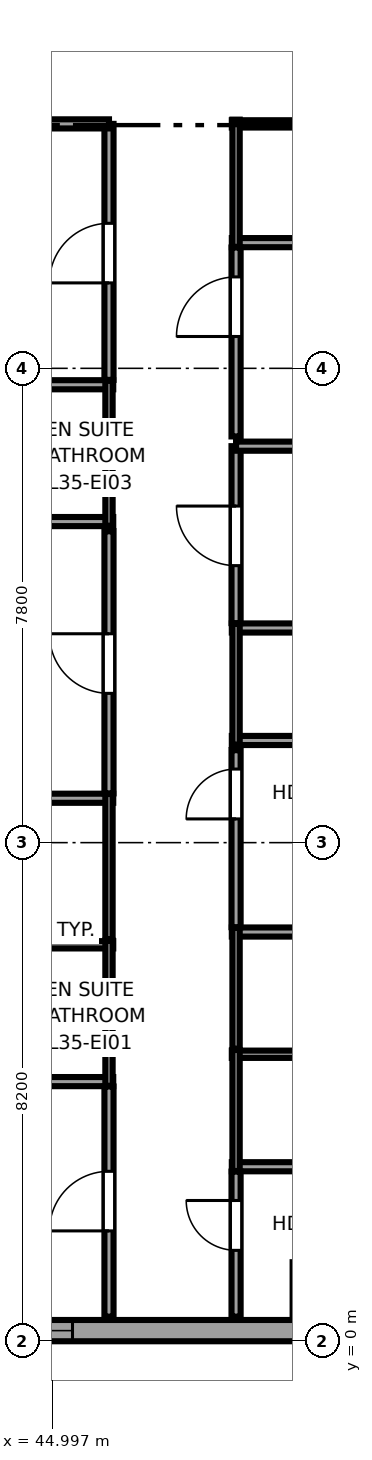
"""IFC4 building model, lengths in metres.
Left out: names, types, materials, properties, quantities, classifications, styles, units other than length and angle.
Written with IfcOpenShell. Run it as: python <this file> out.ifc"""

import sys

from ifc_helpers import new_model, si_unit, direction, frame, frame_2d, origin, place, context, subcontext, project, spatial, rectangle, extrude, source, transform, mapped, element, fill, save


model = new_model("IFC4")
c1 = context("Model", 3, precision=1e-05, world=origin(), true_north=direction((0.0, 1.0)))
c2 = subcontext(c1, "Body", "Model", "MODEL_VIEW")
j1 = project(units=[si_unit("LENGTHUNIT", "METRE"), si_unit("PLANEANGLEUNIT", "RADIAN")], contexts=[c1])
p1 = place(None, origin())
s1 = spatial("IfcSite", under=j1, at=p1, CompositionType="ELEMENT")
p2 = place(p1, origin())
s2 = spatial("IfcBuilding", under=s1, at=p2, CompositionType="ELEMENT")
p3 = place(p2, frame((0.0, 0.0, 136.4)))
s3 = spatial("IfcBuildingStorey", under=s2, at=p3, CompositionType="ELEMENT", Elevation=136.4)
p4 = place(p3, frame((34.375, 0.175, 0.0), z_axis=(0.0, 0.0, 1.0), x_axis=(1.0, 0.0, 0.0)))
e1 = element("IfcWall", 1, at=p4, inside=s3, PredefinedType="SOLIDWALL", context=c2, shape_type="SweptSolid", body=[
    extrude(rectangle(XDim=18.008, YDim=0.35, at=frame_2d((9.004, 0.0))), origin(), (0.0, 0.0, 1.0), 3.37),
])
p5 = place(p4, frame((1.801, 0.0, 0.68)))
e2 = element("IfcOpeningElement", 2, at=p5, cuts=e1, PredefinedType="OPENING", context=c2, shape_type="SweptSolid", body=[
    extrude(rectangle(XDim=1.8, YDim=1.85, at=frame_2d((0.9, 0.925))), frame((0.0, 0.185, 0.0), z_axis=(0.0, -1.0, 0.0), x_axis=(1.0, 0.0, 0.0)), (0.0, 0.0, 1.0), 0.37),
])
p6 = place(p4, frame((4.953, 0.0, 0.68)))
e3 = element("IfcOpeningElement", 3, at=p6, cuts=e1, PredefinedType="OPENING", context=c2, shape_type="SweptSolid", body=[
    extrude(rectangle(XDim=1.8, YDim=1.85, at=frame_2d((0.9, 0.925))), frame((0.0, 0.185, 0.0), z_axis=(0.0, -1.0, 0.0), x_axis=(1.0, 0.0, 0.0)), (0.0, 0.0, 1.0), 0.37),
])
p7 = place(p4, frame((9.155, 0.0, 0.68)))
e4 = element("IfcOpeningElement", 4, at=p7, cuts=e1, PredefinedType="OPENING", context=c2, shape_type="SweptSolid", body=[
    extrude(rectangle(XDim=1.8, YDim=1.85, at=frame_2d((0.9, 0.925))), frame((0.0, 0.185, 0.0), z_axis=(0.0, -1.0, 0.0), x_axis=(1.0, 0.0, 0.0)), (0.0, 0.0, 1.0), 0.37),
])
p8 = place(p4, frame((14.991, 0.0, 0.62)))
e5 = element("IfcOpeningElement", 5, at=p8, cuts=e1, PredefinedType="OPENING", context=c2, shape_type="SweptSolid", body=[
    extrude(rectangle(XDim=1.5, YDim=1.55, at=frame_2d((0.75, 0.775))), frame((0.0, 0.185, 0.0), z_axis=(0.0, -1.0, 0.0), x_axis=(1.0, 0.0, 0.0)), (0.0, 0.0, 1.0), 0.37),
])
p9 = place(p3, frame((43.41, 4.27, 0.0), z_axis=(0.0, 0.0, 1.0), x_axis=(1.0, 0.0, 0.0)))
e6 = element("IfcWall", 6, at=p9, inside=s3, PredefinedType="PARTITIONING", context=c2, shape_type="SweptSolid", body=[
    extrude(rectangle(XDim=2.59, YDim=0.15, at=frame_2d((1.295, 0.0))), origin(), (0.0, 0.0, 1.0), 3.37),
])
p10 = place(p3, frame((43.41, 6.52, 0.0), z_axis=(0.0, 0.0, 1.0), x_axis=(1.0, 0.0, 0.0)))
e7 = element("IfcWall", 7, at=p10, inside=s3, PredefinedType="PLUMBINGWALL", context=c2, shape_type="SweptSolid", body=[
    extrude(rectangle(XDim=2.59, YDim=0.12, at=frame_2d((1.295, 0.0))), origin(), (0.0, 0.0, 1.0), 3.37),
])
p11 = place(p3, frame((45.93, 4.2, 0.0), z_axis=(0.0, 0.0, 1.0), x_axis=(0.0, 1.0, 0.0)))
e8 = element("IfcWall", 8, at=p11, inside=s3, PredefinedType="PLUMBINGWALL", context=c2, shape_type="SweptSolid", body=[
    extrude(rectangle(XDim=2.39, YDim=0.12, at=frame_2d((1.195, 0.0))), origin(), (0.0, 0.0, 1.0), 3.37),
])
p12 = place(p3, frame((43.41, 8.93, 0.0), z_axis=(0.0, 0.0, 1.0), x_axis=(1.0, 0.0, 0.0)))
e9 = element("IfcWall", 9, at=p12, inside=s3, PredefinedType="PARTITIONING", context=c2, shape_type="SweptSolid", body=[
    extrude(rectangle(XDim=2.59, YDim=0.15, at=frame_2d((1.295, 0.0))), origin(), (0.0, 0.0, 1.0), 3.37),
])
p13 = place(p3, frame((45.93, 6.61, 0.0), z_axis=(0.0, 0.0, 1.0), x_axis=(0.0, 1.0, 0.0)))
e10 = element("IfcWall", 10, at=p13, inside=s3, PredefinedType="PLUMBINGWALL", context=c2, shape_type="SweptSolid", body=[
    extrude(rectangle(XDim=2.39, YDim=0.12, at=frame_2d((1.195, 0.0))), origin(), (0.0, 0.0, 1.0), 3.37),
])
p14 = place(p3, frame((34.65, 13.48, 0.0), z_axis=(0.0, 0.0, 1.0), x_axis=(1.0, 0.0, 0.0)))
e11 = element("IfcWall", 11, at=p14, inside=s3, PredefinedType="PARTITIONING", context=c2, shape_type="SweptSolid", body=[
    extrude(rectangle(XDim=11.35, YDim=0.15, at=frame_2d((5.675, 0.0))), origin(), (0.0, 0.0, 1.0), 3.37),
])
p15 = place(p3, frame((43.41, 15.73, 0.0), z_axis=(0.0, 0.0, 1.0), x_axis=(1.0, 0.0, 0.0)))
e12 = element("IfcWall", 12, at=p15, inside=s3, PredefinedType="PARTITIONING", context=c2, shape_type="SweptSolid", body=[
    extrude(rectangle(XDim=2.59, YDim=0.15, at=frame_2d((1.295, 0.0))), origin(), (0.0, 0.0, 1.0), 3.37),
])
p16 = place(p3, frame((45.93, 13.41, 0.0), z_axis=(0.0, 0.0, 1.0), x_axis=(0.0, 1.0, 0.0)))
e13 = element("IfcWall", 13, at=p16, inside=s3, PredefinedType="PLUMBINGWALL", context=c2, shape_type="SweptSolid", body=[
    extrude(rectangle(XDim=2.39, YDim=0.12, at=frame_2d((1.195, 0.0))), origin(), (0.0, 0.0, 1.0), 3.37),
])
p17 = place(p3, frame((47.95, 2.87, 0.0), z_axis=(0.0, 0.0, 1.0), x_axis=(1.0, 0.0, 0.0)))
e14 = element("IfcWall", 14, at=p17, inside=s3, PredefinedType="PARTITIONING", context=c2, shape_type="SweptSolid", body=[
    extrude(rectangle(XDim=2.59, YDim=0.15, at=frame_2d((1.295, 0.0))), origin(), (0.0, 0.0, 1.0), 3.37),
])
p18 = place(p3, frame((47.95, 4.72, 0.0), z_axis=(0.0, 0.0, 1.0), x_axis=(1.0, 0.0, 0.0)))
e15 = element("IfcWall", 15, at=p18, inside=s3, PredefinedType="PLUMBINGWALL", context=c2, shape_type="SweptSolid", body=[
    extrude(rectangle(XDim=2.59, YDim=0.12, at=frame_2d((1.295, 0.0))), origin(), (0.0, 0.0, 1.0), 3.37),
])
p19 = place(p3, frame((48.02, 2.8, 0.0), z_axis=(0.0, 0.0, 1.0), x_axis=(0.0, 1.0, 0.0)))
e16 = element("IfcWall", 16, at=p19, inside=s3, PredefinedType="PLUMBINGWALL", context=c2, shape_type="SweptSolid", body=[
    extrude(rectangle(XDim=1.99, YDim=0.12, at=frame_2d((0.995, 0.0))), origin(), (0.0, 0.0, 1.0), 3.37),
])
p20 = place(p3, frame((47.95, 6.73, 0.0), z_axis=(0.0, 0.0, 1.0), x_axis=(1.0, 0.0, 0.0)))
e17 = element("IfcWall", 17, at=p20, inside=s3, PredefinedType="PARTITIONING", context=c2, shape_type="SweptSolid", body=[
    extrude(rectangle(XDim=2.59, YDim=0.15, at=frame_2d((1.295, 0.0))), origin(), (0.0, 0.0, 1.0), 3.37),
])
p21 = place(p3, frame((48.02, 4.81, 0.0), z_axis=(0.0, 0.0, 1.0), x_axis=(0.0, 1.0, 0.0)))
e18 = element("IfcWall", 18, at=p21, inside=s3, PredefinedType="PLUMBINGWALL", context=c2, shape_type="SweptSolid", body=[
    extrude(rectangle(XDim=1.99, YDim=0.12, at=frame_2d((0.995, 0.0))), origin(), (0.0, 0.0, 1.0), 3.37),
])
p22 = place(p3, frame((47.95, 9.88, 0.0), z_axis=(0.0, 0.0, 1.0), x_axis=(1.0, 0.0, 0.0)))
e19 = element("IfcWall", 19, at=p22, inside=s3, PredefinedType="PARTITIONING", context=c2, shape_type="SweptSolid", body=[
    extrude(rectangle(XDim=8.645, YDim=0.15, at=frame_2d((4.323, 0.0))), origin(), (0.0, 0.0, 1.0), 3.37),
])
p23 = place(p3, frame((47.95, 11.73, 0.0), z_axis=(0.0, 0.0, 1.0), x_axis=(1.0, 0.0, 0.0)))
e20 = element("IfcWall", 20, at=p23, inside=s3, PredefinedType="PARTITIONING", context=c2, shape_type="SweptSolid", body=[
    extrude(rectangle(XDim=2.59, YDim=0.15, at=frame_2d((1.295, 0.0))), origin(), (0.0, 0.0, 1.0), 3.37),
])
p24 = place(p3, frame((48.02, 9.81, 0.0), z_axis=(0.0, 0.0, 1.0), x_axis=(0.0, 1.0, 0.0)))
e21 = element("IfcWall", 21, at=p24, inside=s3, PredefinedType="PLUMBINGWALL", context=c2, shape_type="SweptSolid", body=[
    extrude(rectangle(XDim=1.99, YDim=0.12, at=frame_2d((0.995, 0.0))), origin(), (0.0, 0.0, 1.0), 3.37),
])
p25 = place(p3, frame((47.95, 18.067, 0.0), z_axis=(0.0, 0.0, 1.0), x_axis=(1.0, 0.0, 0.0)))
e22 = element("IfcWall", 22, at=p25, inside=s3, PredefinedType="PARTITIONING", context=c2, shape_type="SweptSolid", body=[
    extrude(rectangle(XDim=2.59, YDim=0.15, at=frame_2d((1.295, 0.0))), origin(), (0.0, 0.0, 1.0), 3.37),
])
p26 = place(p3, frame((47.95, 20.02, 0.0), z_axis=(0.0, 0.0, 1.0), x_axis=(1.0, 0.0, 0.0)))
e23 = element("IfcWall", 23, at=p26, inside=s3, PredefinedType="PLUMBINGWALL", context=c2, shape_type="SweptSolid", body=[
    extrude(rectangle(XDim=2.59, YDim=0.12, at=frame_2d((1.295, 0.0))), origin(), (0.0, 0.0, 1.0), 3.37),
])
p27 = place(p3, frame((48.02, 17.997, 0.0), z_axis=(0.0, 0.0, 1.0), x_axis=(0.0, 1.0, 0.0)))
e24 = element("IfcWall", 24, at=p27, inside=s3, PredefinedType="PLUMBINGWALL", context=c2, shape_type="SweptSolid", body=[
    extrude(rectangle(XDim=2.093, YDim=0.12, at=frame_2d((1.046, 0.0))), origin(), (0.0, 0.0, 1.0), 3.37),
])
p28 = place(p3, frame((45.93, 0.405, 0.0), z_axis=(0.0, 0.0, 1.0), x_axis=(0.0, 1.0, 0.0)))
e25 = element("IfcWall", 25, at=p28, inside=s3, PredefinedType="PARTITIONING", context=c2, shape_type="SweptSolid", body=[
    extrude(rectangle(XDim=3.785, YDim=0.15, at=frame_2d((1.893, 0.0))), origin(), (0.0, 0.0, 1.0), 3.37),
])
p29 = place(p28, frame((1.41, 0.0, 0.0)))
e26 = element("IfcOpeningElement", 26, at=p29, cuts=e25, PredefinedType="OPENING", context=c2, shape_type="SweptSolid", body=[
    extrude(rectangle(XDim=0.98, YDim=2.12, at=frame_2d((0.49, 1.06))), frame((0.0, 0.085, 0.0), z_axis=(0.0, -1.0, 0.0), x_axis=(1.0, 0.0, 0.0)), (0.0, 0.0, 1.0), 0.17),
])
p30 = place(p3, frame((45.93, 9.01, 0.0), z_axis=(0.0, 0.0, 1.0), x_axis=(0.0, 1.0, 0.0)))
e27 = element("IfcWall", 27, at=p30, inside=s3, PredefinedType="PARTITIONING", context=c2, shape_type="SweptSolid", body=[
    extrude(rectangle(XDim=4.31, YDim=0.15, at=frame_2d((2.155, 0.0))), origin(), (0.0, 0.0, 1.0), 3.37),
])
p31 = place(p30, frame((1.645, 0.0, 0.0)))
e28 = element("IfcOpeningElement", 28, at=p31, cuts=e27, PredefinedType="OPENING", context=c2, shape_type="SweptSolid", body=[
    extrude(rectangle(XDim=0.98, YDim=2.12, at=frame_2d((0.49, 1.06))), frame((0.0, 0.085, 0.0), z_axis=(0.0, -1.0, 0.0), x_axis=(1.0, 0.0, 0.0)), (0.0, 0.0, 1.0), 0.17),
])
p32 = place(p3, frame((45.93, 15.81, 0.0), z_axis=(0.0, 0.0, 1.0), x_axis=(0.0, 1.0, 0.0)))
e29 = element("IfcWall", 29, at=p32, inside=s3, PredefinedType="PARTITIONING", context=c2, shape_type="SweptSolid", body=[
    extrude(rectangle(XDim=4.21, YDim=0.15, at=frame_2d((2.105, 0.0))), origin(), (0.0, 0.0, 1.0), 3.37),
])
p33 = place(p32, frame((1.595, 0.0, 0.0)))
e30 = element("IfcOpeningElement", 30, at=p33, cuts=e29, PredefinedType="OPENING", context=c2, shape_type="SweptSolid", body=[
    extrude(rectangle(XDim=0.98, YDim=2.12, at=frame_2d((0.49, 1.06))), frame((0.0, 0.085, 0.0), z_axis=(0.0, -1.0, 0.0), x_axis=(1.0, 0.0, 0.0)), (0.0, 0.0, 1.0), 0.17),
])
p34 = place(p3, frame((34.65, 20.02, 0.0), z_axis=(0.0, 0.0, 1.0), x_axis=(1.0, 0.0, 0.0)))
e31 = element("IfcWall", 31, at=p34, inside=s3, PredefinedType="PARTITIONING", context=c2, shape_type="SweptSolid", body=[
    extrude(rectangle(XDim=11.28, YDim=0.15, at=frame_2d((5.64, 0.0))), origin(), (0.0, 0.0, 1.0), 2.954),
])
p35 = place(p3, frame((48.02, 0.405, 0.0), z_axis=(0.0, 0.0, 1.0), x_axis=(0.0, 1.0, 0.0)))
e32 = element("IfcWall", 32, at=p35, inside=s3, PredefinedType="PARTITIONING", context=c2, shape_type="SweptSolid", body=[
    extrude(rectangle(XDim=2.385, YDim=0.15, at=frame_2d((1.192, 0.0))), origin(), (0.0, 0.0, 1.0), 3.37),
])
p36 = place(p35, frame((1.09, 0.0, 0.0)))
e33 = element("IfcOpeningElement", 33, at=p36, cuts=e32, PredefinedType="OPENING", context=c2, shape_type="SweptSolid", body=[
    extrude(rectangle(XDim=0.82, YDim=2.01, at=frame_2d((0.41, 1.005))), frame((0.0, 0.085, 0.0), z_axis=(0.0, -1.0, 0.0), x_axis=(1.0, 0.0, 0.0)), (0.0, 0.0, 1.0), 0.17),
])
p37 = place(p3, frame((48.02, 6.81, 0.0), z_axis=(0.0, 0.0, 1.0), x_axis=(0.0, 1.0, 0.0)))
e34 = element("IfcWall", 34, at=p37, inside=s3, PredefinedType="PARTITIONING", context=c2, shape_type="SweptSolid", body=[
    extrude(rectangle(XDim=2.91, YDim=0.15, at=frame_2d((1.455, 0.0))), origin(), (0.0, 0.0, 1.0), 3.37),
])
p38 = place(p37, frame((1.78, 0.0, 0.0)))
e35 = element("IfcOpeningElement", 35, at=p38, cuts=e34, PredefinedType="OPENING", context=c2, shape_type="SweptSolid", body=[
    extrude(rectangle(XDim=0.82, YDim=2.01, at=frame_2d((0.41, 1.005))), frame((0.0, 0.085, 0.0), z_axis=(0.0, -1.0, 0.0), x_axis=(1.0, 0.0, 0.0)), (0.0, 0.0, 1.0), 0.17),
])
p39 = place(p3, frame((48.02, 11.81, 0.0), z_axis=(0.0, 0.0, 1.0), x_axis=(0.0, 1.0, 0.0)))
e36 = element("IfcWall", 36, at=p39, inside=s3, PredefinedType="PARTITIONING", context=c2, shape_type="SweptSolid", body=[
    extrude(rectangle(XDim=2.91, YDim=0.15, at=frame_2d((1.455, 0.0))), origin(), (0.0, 0.0, 1.0), 3.37),
])
p40 = place(p39, frame((0.945, 0.0, 0.0)))
e37 = element("IfcOpeningElement", 37, at=p40, cuts=e36, PredefinedType="OPENING", context=c2, shape_type="SweptSolid", body=[
    extrude(rectangle(XDim=0.98, YDim=2.12, at=frame_2d((0.49, 1.06))), frame((0.0, 0.085, 0.0), z_axis=(0.0, -1.0, 0.0), x_axis=(1.0, 0.0, 0.0)), (0.0, 0.0, 1.0), 0.17),
])
p41 = place(p3, frame((48.02, 14.72, 0.0), z_axis=(0.0, 0.0, 1.0), x_axis=(1.0, 0.0, 0.0)))
e38 = element("IfcWall", 38, at=p41, inside=s3, PredefinedType="PARTITIONING", context=c2, shape_type="SweptSolid", body=[
    extrude(rectangle(XDim=8.575, YDim=0.15, at=frame_2d((4.288, 0.0))), origin(), (0.0, 0.0, 1.0), 3.37),
])
p42 = place(p3, frame((48.02, 14.88, 0.0), z_axis=(0.0, 0.0, 1.0), x_axis=(0.0, 1.0, 0.0)))
e39 = element("IfcWall", 39, at=p42, inside=s3, PredefinedType="PARTITIONING", context=c2, shape_type="SweptSolid", body=[
    extrude(rectangle(XDim=3.107, YDim=0.15, at=frame_2d((1.554, 0.0))), origin(), (0.0, 0.0, 1.0), 3.37),
])
p43 = place(p42, frame((1.644, 0.0, 0.0)))
e40 = element("IfcOpeningElement", 40, at=p43, cuts=e39, PredefinedType="OPENING", context=c2, shape_type="SweptSolid", body=[
    extrude(rectangle(XDim=0.98, YDim=2.12, at=frame_2d((0.49, 1.06))), frame((0.0, 0.085, 0.0), z_axis=(0.0, -1.0, 0.0), x_axis=(1.0, 0.0, 0.0)), (0.0, 0.0, 1.0), 0.17),
])
m1 = source(origin(), c2, "Body", "SweptSolid", [
    extrude(rectangle(XDim=1.8, YDim=1.85, at=frame_2d((0.9, 0.925))), frame((0.0, 0.09, 0.0), z_axis=(0.0, -1.0, 0.0), x_axis=(1.0, 0.0, 0.0)), (0.0, 0.0, 1.0), 0.06),
])
p44 = place(p7, origin())
e41 = element("IfcWindow", 41, at=p44, inside=s3, PartitioningType="TRIPLE_PANEL_HORIZONTAL", PredefinedType="WINDOW", context=c2, shape_type="MappedRepresentation", body=[
    mapped(m1, transform((0.0, 0.0, 0.0), x_axis=(1.0, 0.0, 0.0), y_axis=(0.0, 1.0, 0.0), z_axis=(0.0, 0.0, 1.0), scale=1.0)),
])
fill(e4, e41)
m2 = source(origin(), c2, "Body", "SweptSolid", [
    extrude(rectangle(XDim=0.98, YDim=2.12, at=frame_2d((0.49, 1.06))), frame((0.0, 0.025, 0.0), z_axis=(0.0, -1.0, 0.0), x_axis=(1.0, 0.0, 0.0)), (0.0, 0.0, 1.0), 0.05),
])
p45 = place(p29, origin())
e42 = element("IfcDoor", 42, at=p45, inside=s3, OperationType="SINGLE_SWING_LEFT", PredefinedType="DOOR", context=c2, shape_type="MappedRepresentation", body=[
    mapped(m2, transform((0.0, 0.0, 0.0), x_axis=(1.0, 0.0, 0.0), y_axis=(0.0, 1.0, 0.0), z_axis=(0.0, 0.0, 1.0), scale=1.0)),
])
fill(e26, e42)
p46 = place(p31, origin())
e43 = element("IfcDoor", 43, at=p46, inside=s3, OperationType="SINGLE_SWING_RIGHT", PredefinedType="DOOR", context=c2, shape_type="MappedRepresentation", body=[
    mapped(m2, transform((0.0, 0.0, 0.0), x_axis=(1.0, 0.0, 0.0), y_axis=(0.0, 1.0, 0.0), z_axis=(0.0, 0.0, 1.0), scale=1.0)),
])
fill(e28, e43)
p47 = place(p33, origin())
e44 = element("IfcDoor", 44, at=p47, inside=s3, OperationType="SINGLE_SWING_LEFT", PredefinedType="DOOR", context=c2, shape_type="MappedRepresentation", body=[
    mapped(m2, transform((0.0, 0.0, 0.0), x_axis=(1.0, 0.0, 0.0), y_axis=(0.0, 1.0, 0.0), z_axis=(0.0, 0.0, 1.0), scale=1.0)),
])
fill(e30, e44)
m3 = source(origin(), c2, "Body", "SweptSolid", [
    extrude(rectangle(XDim=0.82, YDim=2.01, at=frame_2d((0.41, 1.005))), frame((0.0, 0.025, 0.0), z_axis=(0.0, -1.0, 0.0), x_axis=(1.0, 0.0, 0.0)), (0.0, 0.0, 1.0), 0.05),
])
p48 = place(p36, origin())
e45 = element("IfcDoor", 45, at=p48, inside=s3, OperationType="SINGLE_SWING_RIGHT", PredefinedType="DOOR", context=c2, shape_type="MappedRepresentation", body=[
    mapped(m3, transform((0.0, 0.0, 0.0), x_axis=(1.0, 0.0, 0.0), y_axis=(0.0, 1.0, 0.0), z_axis=(0.0, 0.0, 1.0), scale=1.0)),
])
fill(e33, e45)
p49 = place(p38, origin())
e46 = element("IfcDoor", 46, at=p49, inside=s3, OperationType="SINGLE_SWING_LEFT", PredefinedType="DOOR", context=c2, shape_type="MappedRepresentation", body=[
    mapped(m3, transform((0.0, 0.0, 0.0), x_axis=(1.0, 0.0, 0.0), y_axis=(0.0, 1.0, 0.0), z_axis=(0.0, 0.0, 1.0), scale=1.0)),
])
fill(e35, e46)
p50 = place(p40, origin())
e47 = element("IfcDoor", 47, at=p50, inside=s3, OperationType="SINGLE_SWING_RIGHT", PredefinedType="DOOR", context=c2, shape_type="MappedRepresentation", body=[
    mapped(m2, transform((0.0, 0.0, 0.0), x_axis=(1.0, 0.0, 0.0), y_axis=(0.0, 1.0, 0.0), z_axis=(0.0, 0.0, 1.0), scale=1.0)),
])
fill(e37, e47)
p51 = place(p43, origin())
e48 = element("IfcDoor", 48, at=p51, inside=s3, OperationType="SINGLE_SWING_LEFT", PredefinedType="DOOR", context=c2, shape_type="MappedRepresentation", body=[
    mapped(m2, transform((0.0, 0.0, 0.0), x_axis=(1.0, 0.0, 0.0), y_axis=(0.0, 1.0, 0.0), z_axis=(0.0, 0.0, 1.0), scale=1.0)),
])
fill(e40, e48)
save(model, sys.argv[1])
